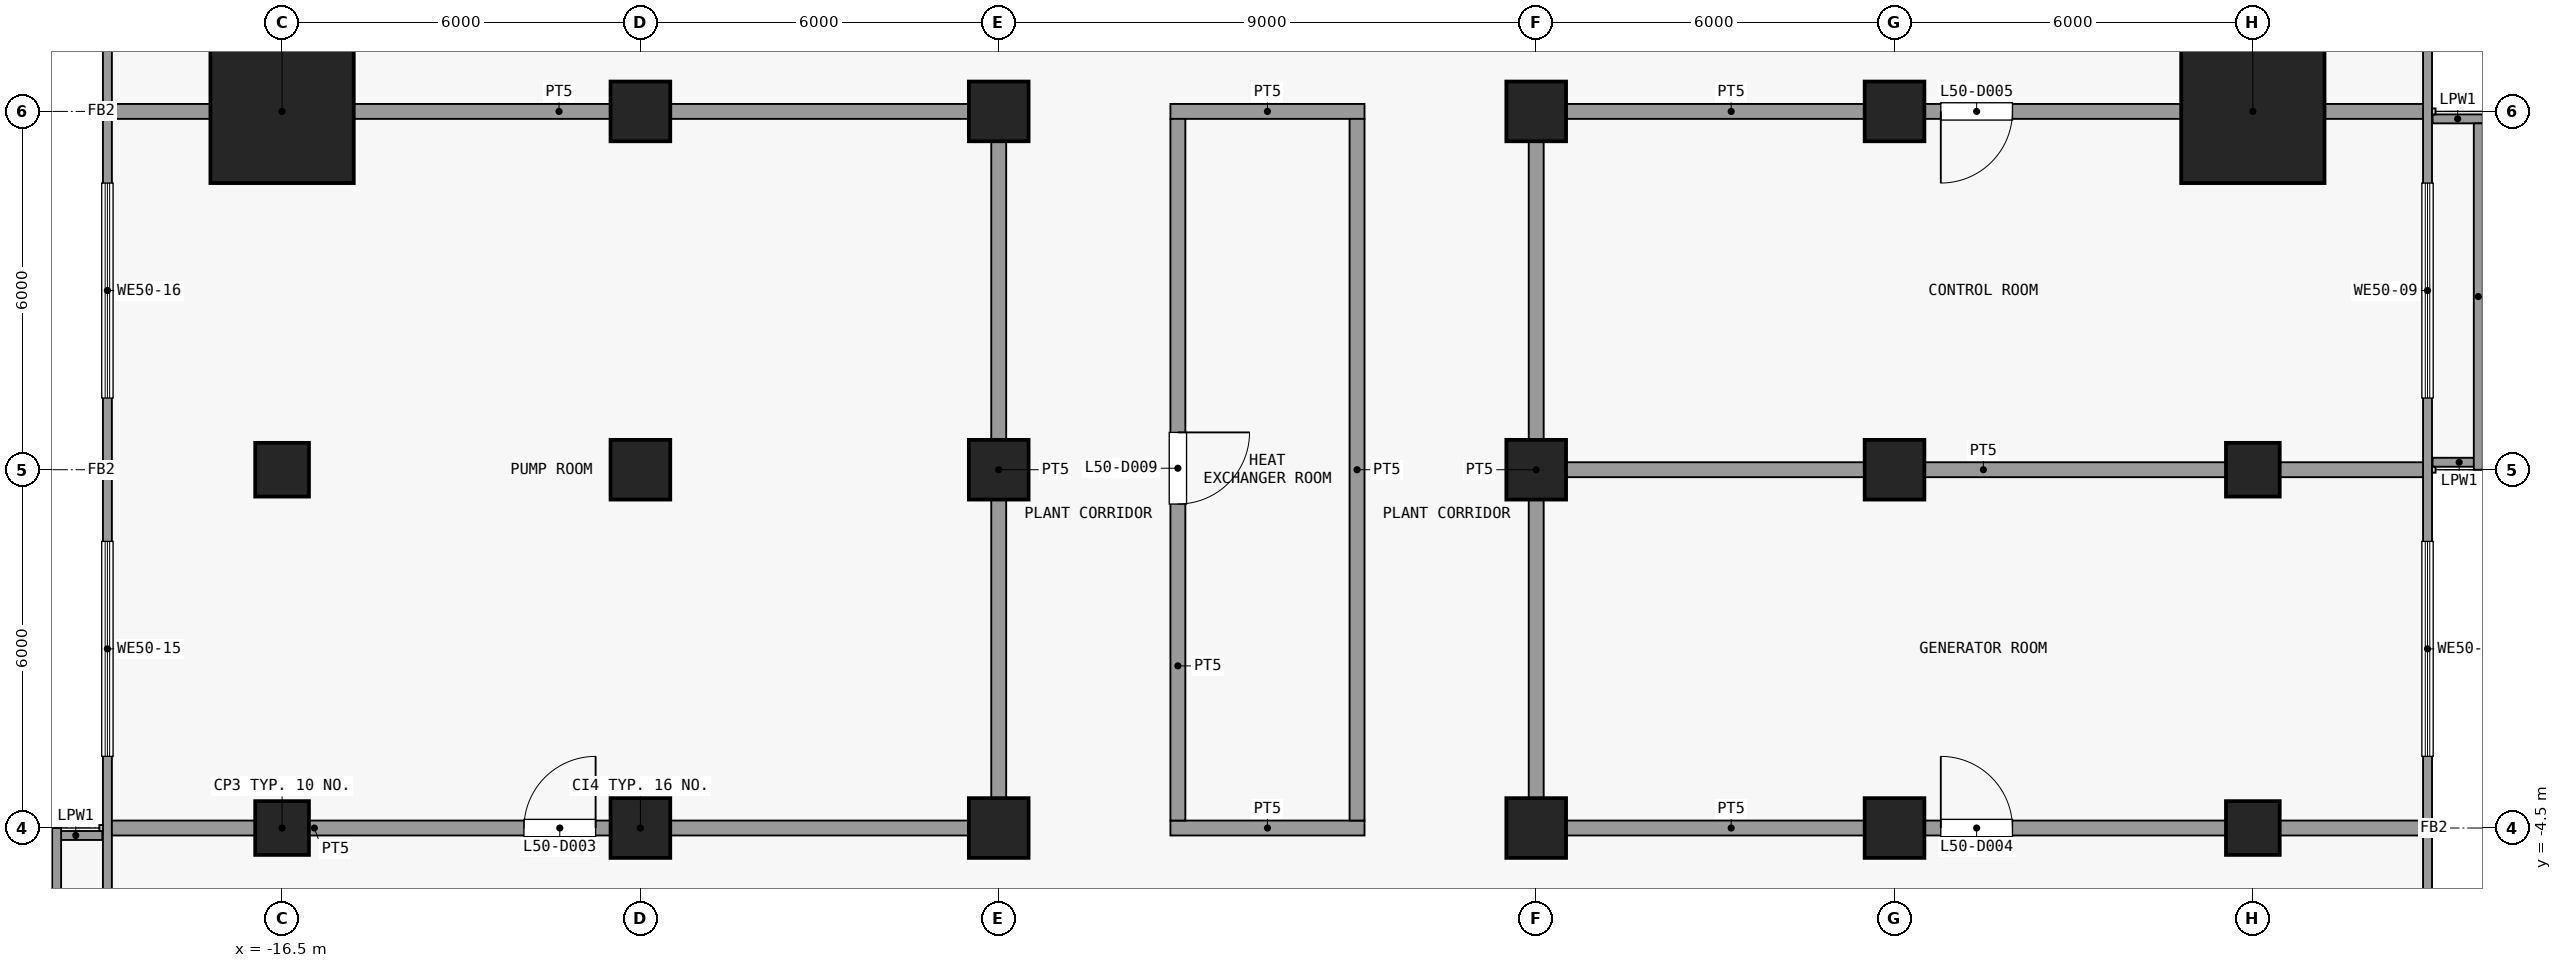
"""IFC4 building model, lengths in metres.
Left out: names, types, materials, properties, quantities, classifications, styles, units other than length and angle.
Written with IfcOpenShell. Run it as: python <this file> out.ifc"""

import sys

from ifc_helpers import new_model, si_unit, direction, frame, frame_2d, origin, origin_2d, place, context, subcontext, project, spatial, rectangle, extrude, element, fill, save


model = new_model("IFC4")
c1 = context("Model", 3, precision=1e-05, world=origin(), true_north=direction((0.0, 1.0)))
c2 = subcontext(c1, "Body", "Model", "MODEL_VIEW")
j1 = project(units=[si_unit("LENGTHUNIT", "METRE"), si_unit("PLANEANGLEUNIT", "RADIAN")], contexts=[c1])
p1 = place(None, origin())
s1 = spatial("IfcSite", under=j1, at=p1, CompositionType="ELEMENT")
p2 = place(p1, origin())
s2 = spatial("IfcBuilding", under=s1, at=p2, CompositionType="ELEMENT")
p3 = place(p2, frame((0.0, 0.0, 199.7)))
s3 = spatial("IfcBuildingStorey", under=s2, at=p3, CompositionType="ELEMENT", Elevation=199.7)
for number, where, z_axis, x_axis in (
    (1, (-16.5, -4.5, 0.0), (0.0, 0.0, 1.0), (1.0, 0.0, 0.0)),
    (2, (-16.5, 1.5, 0.0), (0.0, 0.0, 1.0), (1.0, 0.0, 0.0)),
):
    element("IfcColumn", number, at=place(p3, frame(where, z_axis=z_axis, x_axis=x_axis)), inside=s3, PredefinedType="COLUMN", context=c2, shape_type="SweptSolid", body=[
        extrude(rectangle(XDim=0.9, YDim=0.9, at=origin_2d()), origin(), (0.0, 0.0, 1.0), 5.4),
    ])
p4 = place(p3, frame((-16.5, 7.5, 0.0), z_axis=(0.0, 0.0, 1.0), x_axis=(1.0, 0.0, 0.0)))
e3 = element("IfcColumn", 3, at=p4, inside=s3, PredefinedType="COLUMN", context=c2, shape_type="SweptSolid", body=[
    extrude(rectangle(XDim=2.4, YDim=2.4, at=origin_2d()), origin(), (0.0, 0.0, 1.0), 5.4),
])
for number, where, z_axis, x_axis in (
    (4, (-10.5, -4.5, 0.0), (0.0, 0.0, 1.0), (1.0, 0.0, 0.0)),
    (5, (-10.5, 1.5, 0.0), (0.0, 0.0, 1.0), (1.0, 0.0, 0.0)),
    (6, (-10.5, 7.5, 0.0), (0.0, 0.0, 1.0), (1.0, 0.0, 0.0)),
    (7, (-4.5, -4.5, 0.0), (0.0, 0.0, 1.0), (1.0, 0.0, 0.0)),
    (8, (-4.5, 1.5, 0.0), (0.0, 0.0, 1.0), (1.0, 0.0, 0.0)),
    (9, (-4.5, 7.5, 0.0), (0.0, 0.0, 1.0), (1.0, 0.0, 0.0)),
    (10, (4.5, -4.5, 0.0), (0.0, 0.0, 1.0), (1.0, 0.0, 0.0)),
    (11, (4.5, 1.5, 0.0), (0.0, 0.0, 1.0), (1.0, 0.0, 0.0)),
    (12, (4.5, 7.5, 0.0), (0.0, 0.0, 1.0), (1.0, 0.0, 0.0)),
    (13, (10.5, -4.5, 0.0), (0.0, 0.0, 1.0), (1.0, 0.0, 0.0)),
    (14, (10.5, 1.5, 0.0), (0.0, 0.0, 1.0), (1.0, 0.0, 0.0)),
    (15, (10.5, 7.5, 0.0), (0.0, 0.0, 1.0), (1.0, 0.0, 0.0)),
):
    element("IfcColumn", number, at=place(p3, frame(where, z_axis=z_axis, x_axis=x_axis)), inside=s3, PredefinedType="COLUMN", context=c2, shape_type="SweptSolid", body=[
        extrude(rectangle(XDim=1.0, YDim=1.0, at=origin_2d()), origin(), (0.0, 0.0, 1.0), 5.4),
    ])
for number, where, z_axis, x_axis in (
    (16, (16.5, -4.5, 0.0), (0.0, 0.0, 1.0), (1.0, 0.0, 0.0)),
    (17, (16.5, 1.5, 0.0), (0.0, 0.0, 1.0), (1.0, 0.0, 0.0)),
):
    element("IfcColumn", number, at=place(p3, frame(where, z_axis=z_axis, x_axis=x_axis)), inside=s3, PredefinedType="COLUMN", context=c2, shape_type="SweptSolid", body=[
        extrude(rectangle(XDim=0.9, YDim=0.9, at=origin_2d()), origin(), (0.0, 0.0, 1.0), 5.4),
    ])
p5 = place(p3, frame((16.5, 7.5, 0.0), z_axis=(0.0, 0.0, 1.0), x_axis=(1.0, 0.0, 0.0)))
e18 = element("IfcColumn", 18, at=p5, inside=s3, PredefinedType="COLUMN", context=c2, shape_type="SweptSolid", body=[
    extrude(rectangle(XDim=2.4, YDim=2.4, at=origin_2d()), origin(), (0.0, 0.0, 1.0), 5.4),
])
p6 = place(p3, frame((19.425, 18.35, 0.0), z_axis=(0.0, 0.0, 1.0), x_axis=(0.0, -1.0, 0.0)))
e19 = element("IfcWall", 19, at=p6, inside=s3, PredefinedType="SOLIDWALL", context=c2, shape_type="SweptSolid", body=[
    extrude(rectangle(XDim=39.7, YDim=0.15, at=frame_2d((19.85, 0.0))), origin(), (0.0, 0.0, 1.0), 5.0),
])
p7 = place(p6, frame((33.975, 0.0, 1.2)))
e20 = element("IfcOpeningElement", 20, at=p7, cuts=e19, PredefinedType="OPENING", context=c2, shape_type="SweptSolid", body=[
    extrude(rectangle(XDim=3.6, YDim=3.0, at=frame_2d((1.8, 1.5))), frame((0.0, 0.085, 0.0), z_axis=(0.0, -1.0, 0.0), x_axis=(1.0, 0.0, 0.0)), (0.0, 0.0, 1.0), 0.17),
])
p8 = place(p6, frame((26.525, 0.0, 1.2)))
e21 = element("IfcOpeningElement", 21, at=p8, cuts=e19, PredefinedType="OPENING", context=c2, shape_type="SweptSolid", body=[
    extrude(rectangle(XDim=2.625, YDim=3.0, at=frame_2d((1.312, 1.5))), frame((0.0, 0.085, 0.0), z_axis=(0.0, -1.0, 0.0), x_axis=(1.0, 0.0, 0.0)), (0.0, 0.0, 1.0), 0.17),
])
p9 = place(p6, frame((18.05, 0.0, 1.2)))
e22 = element("IfcOpeningElement", 22, at=p9, cuts=e19, PredefinedType="OPENING", context=c2, shape_type="SweptSolid", body=[
    extrude(rectangle(XDim=3.6, YDim=3.0, at=frame_2d((1.8, 1.5))), frame((0.0, 0.085, 0.0), z_axis=(0.0, -1.0, 0.0), x_axis=(1.0, 0.0, 0.0)), (0.0, 0.0, 1.0), 0.17),
])
p10 = place(p6, frame((12.05, 0.0, 1.2)))
e23 = element("IfcOpeningElement", 23, at=p10, cuts=e19, PredefinedType="OPENING", context=c2, shape_type="SweptSolid", body=[
    extrude(rectangle(XDim=3.6, YDim=3.0, at=frame_2d((1.8, 1.5))), frame((0.0, 0.085, 0.0), z_axis=(0.0, -1.0, 0.0), x_axis=(1.0, 0.0, 0.0)), (0.0, 0.0, 1.0), 0.17),
])
p11 = place(p6, frame((8.125, 0.0, 1.2)))
e24 = element("IfcOpeningElement", 24, at=p11, cuts=e19, PredefinedType="OPENING", context=c2, shape_type="SweptSolid", body=[
    extrude(rectangle(XDim=1.525, YDim=3.0, at=frame_2d((0.762, 1.5))), frame((0.0, 0.085, 0.0), z_axis=(0.0, -1.0, 0.0), x_axis=(1.0, 0.0, 0.0)), (0.0, 0.0, 1.0), 0.17),
])
p12 = place(p6, frame((6.05, 0.0, 1.2)))
e25 = element("IfcOpeningElement", 25, at=p12, cuts=e19, PredefinedType="OPENING", context=c2, shape_type="SweptSolid", body=[
    extrude(rectangle(XDim=1.525, YDim=3.0, at=frame_2d((0.762, 1.5))), frame((0.0, 0.085, 0.0), z_axis=(0.0, -1.0, 0.0), x_axis=(1.0, 0.0, 0.0)), (0.0, 0.0, 1.0), 0.17),
])
p13 = place(p6, frame((0.625, 0.0, 1.2)))
e26 = element("IfcOpeningElement", 26, at=p13, cuts=e19, PredefinedType="OPENING", context=c2, shape_type="SweptSolid", body=[
    extrude(rectangle(XDim=3.6, YDim=3.0, at=frame_2d((1.8, 1.5))), frame((0.0, 0.085, 0.0), z_axis=(0.0, -1.0, 0.0), x_axis=(1.0, 0.0, 0.0)), (0.0, 0.0, 1.0), 0.17),
])
p14 = place(p3, frame((-19.425, -21.35, 0.0), z_axis=(0.0, 0.0, 1.0), x_axis=(0.0, 1.0, 0.0)))
e27 = element("IfcWall", 27, at=p14, inside=s3, PredefinedType="SOLIDWALL", context=c2, shape_type="SweptSolid", body=[
    extrude(rectangle(XDim=39.7, YDim=0.15, at=frame_2d((19.85, 0.0))), origin(), (0.0, 0.0, 1.0), 5.0),
])
p15 = place(p14, frame((2.125, 0.0, 1.2)))
e28 = element("IfcOpeningElement", 28, at=p15, cuts=e27, PredefinedType="OPENING", context=c2, shape_type="SweptSolid", body=[
    extrude(rectangle(XDim=3.6, YDim=3.0, at=frame_2d((1.8, 1.5))), frame((0.0, 0.085, 0.0), z_axis=(0.0, -1.0, 0.0), x_axis=(1.0, 0.0, 0.0)), (0.0, 0.0, 1.0), 0.17),
])
p16 = place(p14, frame((10.55, 0.0, 1.2)))
e29 = element("IfcOpeningElement", 29, at=p16, cuts=e27, PredefinedType="OPENING", context=c2, shape_type="SweptSolid", body=[
    extrude(rectangle(XDim=2.625, YDim=3.0, at=frame_2d((1.312, 1.5))), frame((0.0, 0.085, 0.0), z_axis=(0.0, -1.0, 0.0), x_axis=(1.0, 0.0, 0.0)), (0.0, 0.0, 1.0), 0.17),
])
p17 = place(p14, frame((18.05, 0.0, 1.2)))
e30 = element("IfcOpeningElement", 30, at=p17, cuts=e27, PredefinedType="OPENING", context=c2, shape_type="SweptSolid", body=[
    extrude(rectangle(XDim=3.6, YDim=3.0, at=frame_2d((1.8, 1.5))), frame((0.0, 0.085, 0.0), z_axis=(0.0, -1.0, 0.0), x_axis=(1.0, 0.0, 0.0)), (0.0, 0.0, 1.0), 0.17),
])
p18 = place(p14, frame((24.05, 0.0, 1.2)))
e31 = element("IfcOpeningElement", 31, at=p18, cuts=e27, PredefinedType="OPENING", context=c2, shape_type="SweptSolid", body=[
    extrude(rectangle(XDim=3.6, YDim=3.0, at=frame_2d((1.8, 1.5))), frame((0.0, 0.085, 0.0), z_axis=(0.0, -1.0, 0.0), x_axis=(1.0, 0.0, 0.0)), (0.0, 0.0, 1.0), 0.17),
])
p19 = place(p14, frame((30.05, 0.0, 1.2)))
e32 = element("IfcOpeningElement", 32, at=p19, cuts=e27, PredefinedType="OPENING", context=c2, shape_type="SweptSolid", body=[
    extrude(rectangle(XDim=1.525, YDim=3.0, at=frame_2d((0.762, 1.5))), frame((0.0, 0.085, 0.0), z_axis=(0.0, -1.0, 0.0), x_axis=(1.0, 0.0, 0.0)), (0.0, 0.0, 1.0), 0.17),
])
p20 = place(p14, frame((32.125, 0.0, 1.2)))
e33 = element("IfcOpeningElement", 33, at=p20, cuts=e27, PredefinedType="OPENING", context=c2, shape_type="SweptSolid", body=[
    extrude(rectangle(XDim=1.525, YDim=3.0, at=frame_2d((0.762, 1.5))), frame((0.0, 0.085, 0.0), z_axis=(0.0, -1.0, 0.0), x_axis=(1.0, 0.0, 0.0)), (0.0, 0.0, 1.0), 0.17),
])
p21 = place(p14, frame((35.475, 0.0, 1.2)))
e34 = element("IfcOpeningElement", 34, at=p21, cuts=e27, PredefinedType="OPENING", context=c2, shape_type="SweptSolid", body=[
    extrude(rectangle(XDim=3.6, YDim=3.0, at=frame_2d((1.8, 1.5))), frame((0.0, 0.085, 0.0), z_axis=(0.0, -1.0, 0.0), x_axis=(1.0, 0.0, 0.0)), (0.0, 0.0, 1.0), 0.17),
])
p22 = place(p3, frame((20.4, 1.625, 0.0), z_axis=(0.0, 0.0, 1.0), x_axis=(-1.0, 0.0, 0.0)))
e35 = element("IfcWall", 35, at=p22, inside=s3, PredefinedType="PARAPET", context=c2, shape_type="SweptSolid", body=[
    extrude(rectangle(XDim=0.89, YDim=0.15, at=frame_2d((0.445, 0.0))), origin(), (0.0, 0.0, 1.0), 1.15),
])
p23 = place(p3, frame((19.51, 7.375, 0.0), z_axis=(0.0, 0.0, 1.0), x_axis=(1.0, 0.0, 0.0)))
e36 = element("IfcWall", 36, at=p23, inside=s3, PredefinedType="PARAPET", context=c2, shape_type="SweptSolid", body=[
    extrude(rectangle(XDim=0.84, YDim=0.15, at=frame_2d((0.42, 0.0))), origin(), (0.0, 0.0, 1.0), 1.15),
])
p24 = place(p3, frame((20.275, 7.3, 0.0), z_axis=(0.0, 0.0, 1.0), x_axis=(0.0, -1.0, 0.0)))
e37 = element("IfcWall", 37, at=p24, inside=s3, PredefinedType="PARAPET", context=c2, shape_type="SweptSolid", body=[
    extrude(rectangle(XDim=5.8, YDim=0.15, at=frame_2d((2.9, 0.0))), origin(), (0.0, 0.0, 1.0), 1.15),
])
p25 = place(p3, frame((-20.4, -4.625, 0.0), z_axis=(0.0, 0.0, 1.0), x_axis=(1.0, 0.0, 0.0)))
e38 = element("IfcWall", 38, at=p25, inside=s3, PredefinedType="PARAPET", context=c2, shape_type="SweptSolid", body=[
    extrude(rectangle(XDim=0.89, YDim=0.15, at=frame_2d((0.445, 0.0))), origin(), (0.0, 0.0, 1.0), 1.15),
])
p26 = place(p3, frame((-20.275, -13.3, 0.0), z_axis=(0.0, 0.0, 1.0), x_axis=(0.0, 1.0, 0.0)))
e39 = element("IfcWall", 39, at=p26, inside=s3, PredefinedType="PARAPET", context=c2, shape_type="SweptSolid", body=[
    extrude(rectangle(XDim=8.8, YDim=0.15, at=frame_2d((4.4, 0.0))), origin(), (0.0, 0.0, 1.0), 1.15),
])
p27 = place(p3, frame((-19.35, -4.5, 0.0), z_axis=(0.0, 0.0, 1.0), x_axis=(1.0, 0.0, 0.0)))
e40 = element("IfcWall", 40, at=p27, inside=s3, PredefinedType="PARTITIONING", context=c2, shape_type="SweptSolid", body=[
    extrude(rectangle(XDim=14.975, YDim=0.25, at=frame_2d((7.488, 0.0))), origin(), (0.0, 0.0, 1.0), 5.0),
])
p28 = place(p27, frame((6.9, 0.0, 0.0)))
e41 = element("IfcOpeningElement", 41, at=p28, cuts=e40, PredefinedType="OPENING", context=c2, shape_type="SweptSolid", body=[
    extrude(rectangle(XDim=1.2, YDim=2.1, at=frame_2d((0.6, 1.05))), frame((0.0, 0.135, 0.0), z_axis=(0.0, -1.0, 0.0), x_axis=(1.0, 0.0, 0.0)), (0.0, 0.0, 1.0), 0.27),
])
p29 = place(p3, frame((-1.625, -4.5, 0.0), z_axis=(0.0, 0.0, 1.0), x_axis=(1.0, 0.0, 0.0)))
e42 = element("IfcWall", 42, at=p29, inside=s3, PredefinedType="PARTITIONING", context=c2, shape_type="SweptSolid", body=[
    extrude(rectangle(XDim=3.25, YDim=0.25, at=frame_2d((1.625, 0.0))), origin(), (0.0, 0.0, 1.0), 5.0),
])
p30 = place(p3, frame((4.375, -4.5, 0.0), z_axis=(0.0, 0.0, 1.0), x_axis=(1.0, 0.0, 0.0)))
e43 = element("IfcWall", 43, at=p30, inside=s3, PredefinedType="PARTITIONING", context=c2, shape_type="SweptSolid", body=[
    extrude(rectangle(XDim=14.975, YDim=0.25, at=frame_2d((7.488, 0.0))), origin(), (0.0, 0.0, 1.0), 5.0),
])
p31 = place(p30, frame((6.9, 0.0, 0.0)))
e44 = element("IfcOpeningElement", 44, at=p31, cuts=e43, PredefinedType="OPENING", context=c2, shape_type="SweptSolid", body=[
    extrude(rectangle(XDim=1.2, YDim=2.1, at=frame_2d((0.6, 1.05))), frame((0.0, 0.135, 0.0), z_axis=(0.0, -1.0, 0.0), x_axis=(1.0, 0.0, 0.0)), (0.0, 0.0, 1.0), 0.27),
])
p32 = place(p3, frame((4.625, 1.5, 0.0), z_axis=(0.0, 0.0, 1.0), x_axis=(1.0, 0.0, 0.0)))
e45 = element("IfcWall", 45, at=p32, inside=s3, PredefinedType="PARTITIONING", context=c2, shape_type="SweptSolid", body=[
    extrude(rectangle(XDim=14.725, YDim=0.25, at=frame_2d((7.363, 0.0))), origin(), (0.0, 0.0, 1.0), 5.0),
])
p33 = place(p3, frame((-19.35, 7.5, 0.0), z_axis=(0.0, 0.0, 1.0), x_axis=(1.0, 0.0, 0.0)))
e46 = element("IfcWall", 46, at=p33, inside=s3, PredefinedType="PARTITIONING", context=c2, shape_type="SweptSolid", body=[
    extrude(rectangle(XDim=14.975, YDim=0.25, at=frame_2d((7.488, 0.0))), origin(), (0.0, 0.0, 1.0), 5.0),
])
p34 = place(p3, frame((-1.625, 7.5, 0.0), z_axis=(0.0, 0.0, 1.0), x_axis=(1.0, 0.0, 0.0)))
e47 = element("IfcWall", 47, at=p34, inside=s3, PredefinedType="PARTITIONING", context=c2, shape_type="SweptSolid", body=[
    extrude(rectangle(XDim=3.25, YDim=0.25, at=frame_2d((1.625, 0.0))), origin(), (0.0, 0.0, 1.0), 5.0),
])
p35 = place(p3, frame((4.375, 7.5, 0.0), z_axis=(0.0, 0.0, 1.0), x_axis=(1.0, 0.0, 0.0)))
e48 = element("IfcWall", 48, at=p35, inside=s3, PredefinedType="PARTITIONING", context=c2, shape_type="SweptSolid", body=[
    extrude(rectangle(XDim=14.975, YDim=0.25, at=frame_2d((7.488, 0.0))), origin(), (0.0, 0.0, 1.0), 5.0),
])
p36 = place(p35, frame((6.9, 0.0, 0.0)))
e49 = element("IfcOpeningElement", 49, at=p36, cuts=e48, PredefinedType="OPENING", context=c2, shape_type="SweptSolid", body=[
    extrude(rectangle(XDim=1.2, YDim=2.1, at=frame_2d((0.6, 1.05))), frame((0.0, 0.135, 0.0), z_axis=(0.0, -1.0, 0.0), x_axis=(1.0, 0.0, 0.0)), (0.0, 0.0, 1.0), 0.27),
])
p37 = place(p3, frame((-4.5, -4.375, 0.0), z_axis=(0.0, 0.0, 1.0), x_axis=(0.0, 1.0, 0.0)))
e50 = element("IfcWall", 50, at=p37, inside=s3, PredefinedType="PARTITIONING", context=c2, shape_type="SweptSolid", body=[
    extrude(rectangle(XDim=11.75, YDim=0.25, at=frame_2d((5.875, 0.0))), origin(), (0.0, 0.0, 1.0), 5.0),
])
p38 = place(p3, frame((-1.5, -4.375, 0.0), z_axis=(0.0, 0.0, 1.0), x_axis=(0.0, 1.0, 0.0)))
e51 = element("IfcWall", 51, at=p38, inside=s3, PredefinedType="PARTITIONING", context=c2, shape_type="SweptSolid", body=[
    extrude(rectangle(XDim=11.75, YDim=0.25, at=frame_2d((5.875, 0.0))), origin(), (0.0, 0.0, 1.0), 5.0),
])
p39 = place(p38, frame((5.3, 0.0, 0.0)))
e52 = element("IfcOpeningElement", 52, at=p39, cuts=e51, PredefinedType="OPENING", context=c2, shape_type="SweptSolid", body=[
    extrude(rectangle(XDim=1.2, YDim=2.1, at=frame_2d((0.6, 1.05))), frame((0.0, 0.135, 0.0), z_axis=(0.0, -1.0, 0.0), x_axis=(1.0, 0.0, 0.0)), (0.0, 0.0, 1.0), 0.27),
])
for number, where, z_axis, x_axis in (
    (53, (1.5, -4.375, 0.0), (0.0, 0.0, 1.0), (0.0, 1.0, 0.0)),
    (54, (4.5, -4.375, 0.0), (0.0, 0.0, 1.0), (0.0, 1.0, 0.0)),
):
    element("IfcWall", number, at=place(p3, frame(where, z_axis=z_axis, x_axis=x_axis)), inside=s3, PredefinedType="PARTITIONING", context=c2, shape_type="SweptSolid", body=[
        extrude(rectangle(XDim=11.75, YDim=0.25, at=frame_2d((5.875, 0.0))), origin(), (0.0, 0.0, 1.0), 5.0),
    ])
p40 = place(p9, origin())
e55 = element("IfcWindow", 55, at=p40, inside=s3, PartitioningType="SINGLE_PANEL", PredefinedType="WINDOW", context=c2, shape_type="SweptSolid", body=[
    extrude(rectangle(XDim=3.6, YDim=3.0, at=frame_2d((1.8, 1.5))), frame((0.0, 0.03, 0.0), z_axis=(0.0, -1.0, 0.0), x_axis=(1.0, 0.0, 0.0)), (0.0, 0.0, 1.0), 0.06),
])
fill(e22, e55)
p41 = place(p10, origin())
e56 = element("IfcWindow", 56, at=p41, inside=s3, PartitioningType="SINGLE_PANEL", PredefinedType="WINDOW", context=c2, shape_type="SweptSolid", body=[
    extrude(rectangle(XDim=3.6, YDim=3.0, at=frame_2d((1.8, 1.5))), frame((0.0, 0.03, 0.0), z_axis=(0.0, -1.0, 0.0), x_axis=(1.0, 0.0, 0.0)), (0.0, 0.0, 1.0), 0.06),
])
fill(e23, e56)
p42 = place(p17, origin())
e57 = element("IfcWindow", 57, at=p42, inside=s3, PartitioningType="SINGLE_PANEL", PredefinedType="WINDOW", context=c2, shape_type="SweptSolid", body=[
    extrude(rectangle(XDim=3.6, YDim=3.0, at=frame_2d((1.8, 1.5))), frame((0.0, 0.03, 0.0), z_axis=(0.0, -1.0, 0.0), x_axis=(1.0, 0.0, 0.0)), (0.0, 0.0, 1.0), 0.06),
])
fill(e30, e57)
p43 = place(p18, origin())
e58 = element("IfcWindow", 58, at=p43, inside=s3, PartitioningType="SINGLE_PANEL", PredefinedType="WINDOW", context=c2, shape_type="SweptSolid", body=[
    extrude(rectangle(XDim=3.6, YDim=3.0, at=frame_2d((1.8, 1.5))), frame((0.0, 0.03, 0.0), z_axis=(0.0, -1.0, 0.0), x_axis=(1.0, 0.0, 0.0)), (0.0, 0.0, 1.0), 0.06),
])
fill(e31, e58)
p44 = place(p28, origin())
e59 = element("IfcDoor", 59, at=p44, inside=s3, OperationType="SINGLE_SWING_LEFT", PredefinedType="DOOR", context=c2, shape_type="SweptSolid", body=[
    extrude(rectangle(XDim=1.2, YDim=2.1, at=frame_2d((0.6, 1.05))), frame((0.0, 0.025, 0.0), z_axis=(0.0, -1.0, 0.0), x_axis=(1.0, 0.0, 0.0)), (0.0, 0.0, 1.0), 0.05),
])
fill(e41, e59)
p45 = place(p31, origin())
e60 = element("IfcDoor", 60, at=p45, inside=s3, OperationType="SINGLE_SWING_RIGHT", PredefinedType="DOOR", context=c2, shape_type="SweptSolid", body=[
    extrude(rectangle(XDim=1.2, YDim=2.1, at=frame_2d((0.6, 1.05))), frame((0.0, 0.025, 0.0), z_axis=(0.0, -1.0, 0.0), x_axis=(1.0, 0.0, 0.0)), (0.0, 0.0, 1.0), 0.05),
])
fill(e44, e60)
p46 = place(p36, origin())
e61 = element("IfcDoor", 61, at=p46, inside=s3, OperationType="SINGLE_SWING_LEFT", PredefinedType="DOOR", context=c2, shape_type="SweptSolid", body=[
    extrude(rectangle(XDim=1.2, YDim=2.1, at=frame_2d((0.6, 1.05))), frame((0.0, 0.025, 0.0), z_axis=(0.0, -1.0, 0.0), x_axis=(1.0, 0.0, 0.0)), (0.0, 0.0, 1.0), 0.05),
])
fill(e49, e61)
p47 = place(p39, origin())
e62 = element("IfcDoor", 62, at=p47, inside=s3, OperationType="SINGLE_SWING_RIGHT", PredefinedType="DOOR", context=c2, shape_type="SweptSolid", body=[
    extrude(rectangle(XDim=1.2, YDim=2.1, at=frame_2d((0.6, 1.05))), frame((0.0, 0.025, 0.0), z_axis=(0.0, -1.0, 0.0), x_axis=(1.0, 0.0, 0.0)), (0.0, 0.0, 1.0), 0.05),
])
fill(e52, e62)
save(model, sys.argv[1])
